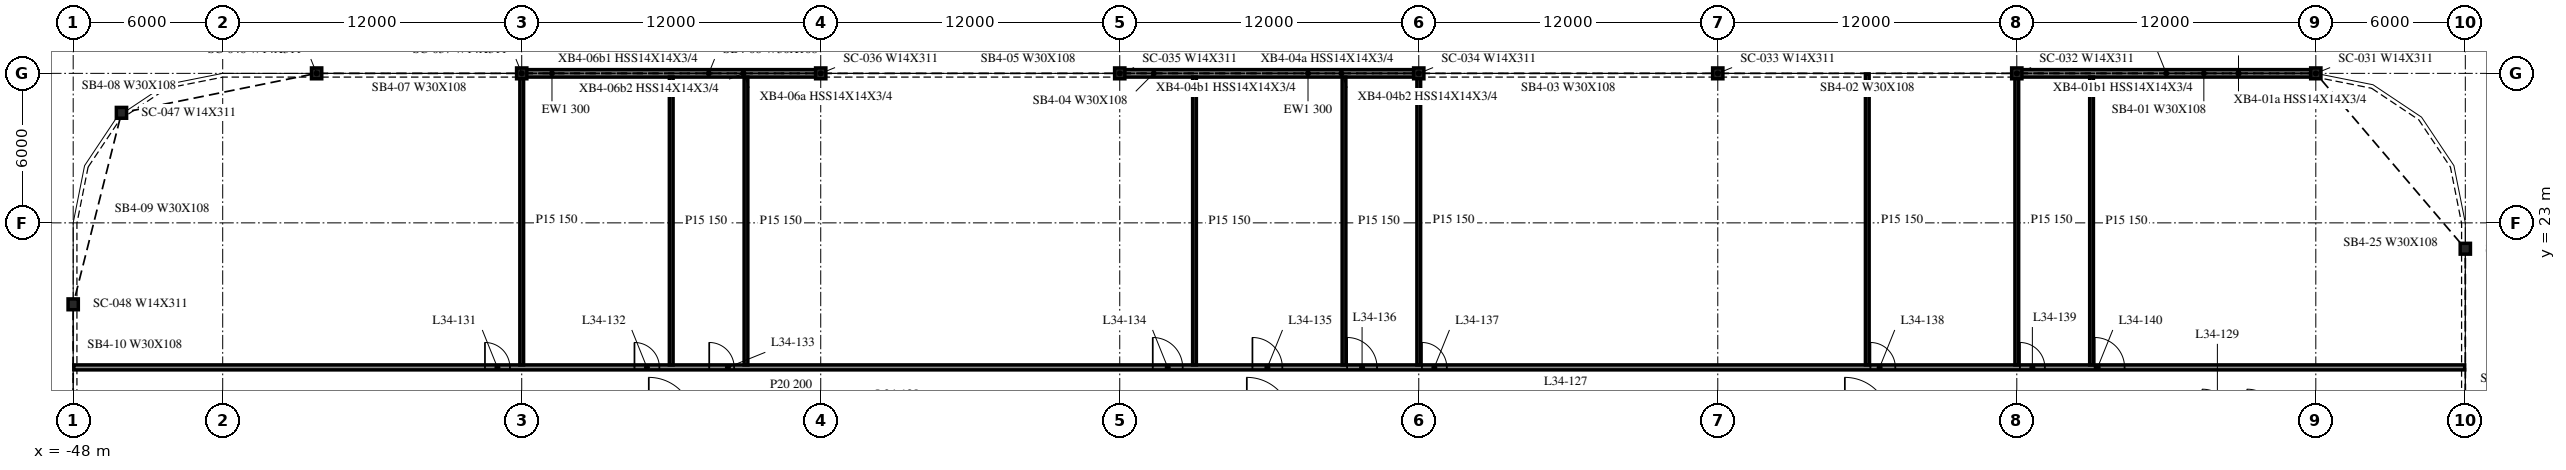
"""IFC4 building model, lengths in metres.
Left out: names, types, materials, properties, quantities, classifications, styles, units other than length and angle.
Written with IfcOpenShell. Run it as: python <this file> out.ifc"""

import sys

from ifc_helpers import new_model, si_unit, direction, frame, frame_2d, origin, origin_2d, place, context, subcontext, project, spatial, rectangle, i_section, extrude, element, fill, save


model = new_model("IFC4")
c1 = context("Model", 3, precision=1e-05, world=origin(), true_north=direction((0.0, 1.0)))
c2 = subcontext(c1, "Body", "Model", "MODEL_VIEW")
j1 = project(units=[si_unit("LENGTHUNIT", "METRE"), si_unit("PLANEANGLEUNIT", "RADIAN")], contexts=[c1])
p1 = place(None, origin())
s1 = spatial("IfcSite", under=j1, at=p1, CompositionType="ELEMENT")
p2 = place(p1, origin())
s2 = spatial("IfcBuilding", under=s1, at=p2, CompositionType="ELEMENT")
p3 = place(p2, frame((0.0, 0.0, 146.6)))
s3 = spatial("IfcBuildingStorey", under=s2, at=p3, CompositionType="ELEMENT", Elevation=146.6)
for number, where, z_axis, x_axis in (
    (1, (42.0, 29.0, -0.34), (0.0, 0.0, 1.0), (1.0, 0.0, 0.0)),
    (2, (30.0, 29.0, -0.34), (0.0, 0.0, 1.0), (1.0, 0.0, 0.0)),
    (3, (18.0, 29.0, -0.34), (0.0, 0.0, 1.0), (1.0, 0.0, 0.0)),
    (4, (6.0, 29.0, -0.34), (0.0, 0.0, 1.0), (1.0, 0.0, 0.0)),
    (5, (-6.0, 29.0, -0.34), (0.0, 0.0, 1.0), (1.0, 0.0, 0.0)),
    (6, (-18.0, 29.0, -0.34), (0.0, 0.0, 1.0), (1.0, 0.0, 0.0)),
    (7, (-30.0, 29.0, -0.34), (0.0, 0.0, 1.0), (1.0, 0.0, 0.0)),
    (8, (-38.231, 29.0, -0.34), (0.0, 0.0, 1.0), (1.0, 0.0, 0.0)),
    (9, (-46.062, 27.416, -0.34), (0.0, 0.0, 1.0), (1.0, 0.0, 0.0)),
    (10, (-48.0, 19.731, -0.34), (0.0, 0.0, 1.0), (1.0, 0.0, 0.0)),
    (11, (48.0, 21.962, -0.34), (0.0, 0.0, 1.0), (1.0, 0.0, 0.0)),
):
    element("IfcColumn", number, at=place(p3, frame(where, z_axis=z_axis, x_axis=x_axis)), inside=s3, PredefinedType="COLUMN", context=c2, shape_type="SweptSolid", body=[
        extrude(i_section(OverallWidth=0.412, OverallDepth=0.434, WebThickness=0.036, FlangeThickness=0.057, at=origin_2d()), origin(), (0.0, 0.0, 1.0), 4.1),
    ])
for number, where, z_axis, x_axis in (
    (12, (41.982, 29.0, 0.0), (0.0, 0.0, 1.0), (-1.0, 0.0, 0.0)),
    (13, (5.982, 29.0, 0.0), (0.0, 0.0, 1.0), (-1.0, 0.0, 0.0)),
    (14, (-18.018, 29.0, 0.0), (0.0, 0.0, 1.0), (-1.0, 0.0, 0.0)),
):
    element("IfcWall", number, at=place(p3, frame(where, z_axis=z_axis, x_axis=x_axis)), inside=s3, PredefinedType="NOTDEFINED", context=c2, shape_type="SweptSolid", body=[
        extrude(rectangle(XDim=11.964, YDim=0.3, at=frame_2d((5.982, 0.0))), origin(), (0.0, 0.0, 1.0), 3.003),
    ])
p4 = place(p3, frame((-47.975, 17.2, 0.0), z_axis=(0.0, 0.0, 1.0), x_axis=(1.0, 0.0, 0.0)))
e15 = element("IfcWall", 15, at=p4, inside=s3, PredefinedType="PARTITIONING", context=c2, shape_type="SweptSolid", body=[
    extrude(rectangle(XDim=95.95, YDim=0.2, at=frame_2d((47.975, 0.0))), origin(), (0.0, 0.0, 1.0), 3.76),
])
p5 = place(p4, frame((16.5, 0.0, 0.0)))
e16 = element("IfcOpeningElement", 16, at=p5, cuts=e15, PredefinedType="OPENING", context=c2, shape_type="SweptSolid", body=[
    extrude(rectangle(XDim=1.0, YDim=2.1, at=frame_2d((0.5, 1.05))), frame((0.0, 0.11, 0.0), z_axis=(0.0, -1.0, 0.0), x_axis=(1.0, 0.0, 0.0)), (0.0, 0.0, 1.0), 0.22),
])
p6 = place(p4, frame((22.5, 0.0, 0.0)))
e17 = element("IfcOpeningElement", 17, at=p6, cuts=e15, PredefinedType="OPENING", context=c2, shape_type="SweptSolid", body=[
    extrude(rectangle(XDim=1.0, YDim=2.1, at=frame_2d((0.5, 1.05))), frame((0.0, 0.11, 0.0), z_axis=(0.0, -1.0, 0.0), x_axis=(1.0, 0.0, 0.0)), (0.0, 0.0, 1.0), 0.22),
])
p7 = place(p4, frame((25.5, 0.0, 0.0)))
e18 = element("IfcOpeningElement", 18, at=p7, cuts=e15, PredefinedType="OPENING", context=c2, shape_type="SweptSolid", body=[
    extrude(rectangle(XDim=1.0, YDim=2.1, at=frame_2d((0.5, 1.05))), frame((0.0, 0.11, 0.0), z_axis=(0.0, -1.0, 0.0), x_axis=(1.0, 0.0, 0.0)), (0.0, 0.0, 1.0), 0.22),
])
p8 = place(p4, frame((43.3, 0.0, 0.0)))
e19 = element("IfcOpeningElement", 19, at=p8, cuts=e15, PredefinedType="OPENING", context=c2, shape_type="SweptSolid", body=[
    extrude(rectangle(XDim=1.2, YDim=2.1, at=frame_2d((0.6, 1.05))), frame((0.0, 0.11, 0.0), z_axis=(0.0, -1.0, 0.0), x_axis=(1.0, 0.0, 0.0)), (0.0, 0.0, 1.0), 0.22),
])
p9 = place(p4, frame((47.3, 0.0, 0.0)))
e20 = element("IfcOpeningElement", 20, at=p9, cuts=e15, PredefinedType="OPENING", context=c2, shape_type="SweptSolid", body=[
    extrude(rectangle(XDim=1.2, YDim=2.1, at=frame_2d((0.6, 1.05))), frame((0.0, 0.11, 0.0), z_axis=(0.0, -1.0, 0.0), x_axis=(1.0, 0.0, 0.0)), (0.0, 0.0, 1.0), 0.22),
])
p10 = place(p4, frame((51.1, 0.0, 0.0)))
e21 = element("IfcOpeningElement", 21, at=p10, cuts=e15, PredefinedType="OPENING", context=c2, shape_type="SweptSolid", body=[
    extrude(rectangle(XDim=1.2, YDim=2.1, at=frame_2d((0.6, 1.05))), frame((0.0, 0.11, 0.0), z_axis=(0.0, -1.0, 0.0), x_axis=(1.0, 0.0, 0.0)), (0.0, 0.0, 1.0), 0.22),
])
p11 = place(p4, frame((54.1, 0.0, 0.0)))
e22 = element("IfcOpeningElement", 22, at=p11, cuts=e15, PredefinedType="OPENING", context=c2, shape_type="SweptSolid", body=[
    extrude(rectangle(XDim=1.0, YDim=2.1, at=frame_2d((0.5, 1.05))), frame((0.0, 0.11, 0.0), z_axis=(0.0, -1.0, 0.0), x_axis=(1.0, 0.0, 0.0)), (0.0, 0.0, 1.0), 0.22),
])
p12 = place(p4, frame((72.1, 0.0, 0.0)))
e23 = element("IfcOpeningElement", 23, at=p12, cuts=e15, PredefinedType="OPENING", context=c2, shape_type="SweptSolid", body=[
    extrude(rectangle(XDim=1.0, YDim=2.1, at=frame_2d((0.5, 1.05))), frame((0.0, 0.11, 0.0), z_axis=(0.0, -1.0, 0.0), x_axis=(1.0, 0.0, 0.0)), (0.0, 0.0, 1.0), 0.22),
])
p13 = place(p4, frame((78.1, 0.0, 0.0)))
e24 = element("IfcOpeningElement", 24, at=p13, cuts=e15, PredefinedType="OPENING", context=c2, shape_type="SweptSolid", body=[
    extrude(rectangle(XDim=1.0, YDim=2.1, at=frame_2d((0.5, 1.05))), frame((0.0, 0.11, 0.0), z_axis=(0.0, -1.0, 0.0), x_axis=(1.0, 0.0, 0.0)), (0.0, 0.0, 1.0), 0.22),
])
p14 = place(p4, frame((81.1, 0.0, 0.0)))
e25 = element("IfcOpeningElement", 25, at=p14, cuts=e15, PredefinedType="OPENING", context=c2, shape_type="SweptSolid", body=[
    extrude(rectangle(XDim=1.2, YDim=2.1, at=frame_2d((0.6, 1.05))), frame((0.0, 0.11, 0.0), z_axis=(0.0, -1.0, 0.0), x_axis=(1.0, 0.0, 0.0)), (0.0, 0.0, 1.0), 0.22),
])
p15 = place(p3, frame((-30.0, 17.3, 0.0), z_axis=(0.0, 0.0, 1.0), x_axis=(0.0, 1.0, 0.0)))
e26 = element("IfcWall", 26, at=p15, inside=s3, PredefinedType="PARTITIONING", context=c2, shape_type="SweptSolid", body=[
    extrude(rectangle(XDim=11.675, YDim=0.15, at=frame_2d((5.837, 0.0))), origin(), (0.0, 0.0, 1.0), 3.76),
])
for number, where, z_axis, x_axis in (
    (27, (-24.0, 17.3, 0.0), (0.0, 0.0, 1.0), (0.0, 1.0, 0.0)),
    (28, (-21.0, 17.3, 0.0), (0.0, 0.0, 1.0), (0.0, 1.0, 0.0)),
    (29, (-3.0, 17.3, 0.0), (0.0, 0.0, 1.0), (0.0, 1.0, 0.0)),
    (30, (3.0, 17.3, 0.0), (0.0, 0.0, 1.0), (0.0, 1.0, 0.0)),
):
    element("IfcWall", number, at=place(p3, frame(where, z_axis=z_axis, x_axis=x_axis)), inside=s3, PredefinedType="PARTITIONING", context=c2, shape_type="SweptSolid", body=[
        extrude(rectangle(XDim=11.55, YDim=0.15, at=frame_2d((5.775, 0.0))), origin(), (0.0, 0.0, 1.0), 3.76),
    ])
for number, where, z_axis, x_axis in (
    (31, (6.0, 17.3, 0.0), (0.0, 0.0, 1.0), (0.0, 1.0, 0.0)),
    (32, (24.0, 17.3, 0.0), (0.0, 0.0, 1.0), (0.0, 1.0, 0.0)),
    (33, (30.0, 17.3, 0.0), (0.0, 0.0, 1.0), (0.0, 1.0, 0.0)),
):
    element("IfcWall", number, at=place(p3, frame(where, z_axis=z_axis, x_axis=x_axis)), inside=s3, PredefinedType="PARTITIONING", context=c2, shape_type="SweptSolid", body=[
        extrude(rectangle(XDim=11.675, YDim=0.15, at=frame_2d((5.837, 0.0))), origin(), (0.0, 0.0, 1.0), 3.76),
    ])
p16 = place(p3, frame((33.0, 17.3, 0.0), z_axis=(0.0, 0.0, 1.0), x_axis=(0.0, 1.0, 0.0)))
e34 = element("IfcWall", 34, at=p16, inside=s3, PredefinedType="PARTITIONING", context=c2, shape_type="SweptSolid", body=[
    extrude(rectangle(XDim=11.55, YDim=0.15, at=frame_2d((5.775, 0.0))), origin(), (0.0, 0.0, 1.0), 3.76),
])
p17 = place(p5, origin())
e35 = element("IfcDoor", 35, at=p17, inside=s3, OperationType="SINGLE_SWING_LEFT", PredefinedType="DOOR", context=c2, shape_type="SweptSolid", body=[
    extrude(rectangle(XDim=1.0, YDim=2.1, at=frame_2d((0.5, 1.05))), frame((0.0, 0.025, 0.0), z_axis=(0.0, -1.0, 0.0), x_axis=(1.0, 0.0, 0.0)), (0.0, 0.0, 1.0), 0.05),
])
fill(e16, e35)
p18 = place(p6, origin())
e36 = element("IfcDoor", 36, at=p18, inside=s3, OperationType="SINGLE_SWING_LEFT", PredefinedType="DOOR", context=c2, shape_type="SweptSolid", body=[
    extrude(rectangle(XDim=1.0, YDim=2.1, at=frame_2d((0.5, 1.05))), frame((0.0, 0.025, 0.0), z_axis=(0.0, -1.0, 0.0), x_axis=(1.0, 0.0, 0.0)), (0.0, 0.0, 1.0), 0.05),
])
fill(e17, e36)
p19 = place(p7, origin())
e37 = element("IfcDoor", 37, at=p19, inside=s3, OperationType="SINGLE_SWING_LEFT", PredefinedType="DOOR", context=c2, shape_type="SweptSolid", body=[
    extrude(rectangle(XDim=1.0, YDim=2.1, at=frame_2d((0.5, 1.05))), frame((0.0, 0.025, 0.0), z_axis=(0.0, -1.0, 0.0), x_axis=(1.0, 0.0, 0.0)), (0.0, 0.0, 1.0), 0.05),
])
fill(e18, e37)
p20 = place(p8, origin())
e38 = element("IfcDoor", 38, at=p20, inside=s3, OperationType="SINGLE_SWING_LEFT", PredefinedType="DOOR", context=c2, shape_type="SweptSolid", body=[
    extrude(rectangle(XDim=1.2, YDim=2.1, at=frame_2d((0.6, 1.05))), frame((0.0, 0.025, 0.0), z_axis=(0.0, -1.0, 0.0), x_axis=(1.0, 0.0, 0.0)), (0.0, 0.0, 1.0), 0.05),
])
fill(e19, e38)
p21 = place(p9, origin())
e39 = element("IfcDoor", 39, at=p21, inside=s3, OperationType="SINGLE_SWING_RIGHT", PredefinedType="DOOR", context=c2, shape_type="SweptSolid", body=[
    extrude(rectangle(XDim=1.2, YDim=2.1, at=frame_2d((0.6, 1.05))), frame((0.0, 0.025, 0.0), z_axis=(0.0, -1.0, 0.0), x_axis=(1.0, 0.0, 0.0)), (0.0, 0.0, 1.0), 0.05),
])
fill(e20, e39)
p22 = place(p10, origin())
e40 = element("IfcDoor", 40, at=p22, inside=s3, OperationType="SINGLE_SWING_RIGHT", PredefinedType="DOOR", context=c2, shape_type="SweptSolid", body=[
    extrude(rectangle(XDim=1.2, YDim=2.1, at=frame_2d((0.6, 1.05))), frame((0.0, 0.025, 0.0), z_axis=(0.0, -1.0, 0.0), x_axis=(1.0, 0.0, 0.0)), (0.0, 0.0, 1.0), 0.05),
])
fill(e21, e40)
p23 = place(p11, origin())
e41 = element("IfcDoor", 41, at=p23, inside=s3, OperationType="SINGLE_SWING_RIGHT", PredefinedType="DOOR", context=c2, shape_type="SweptSolid", body=[
    extrude(rectangle(XDim=1.0, YDim=2.1, at=frame_2d((0.5, 1.05))), frame((0.0, 0.025, 0.0), z_axis=(0.0, -1.0, 0.0), x_axis=(1.0, 0.0, 0.0)), (0.0, 0.0, 1.0), 0.05),
])
fill(e22, e41)
p24 = place(p12, origin())
e42 = element("IfcDoor", 42, at=p24, inside=s3, OperationType="SINGLE_SWING_RIGHT", PredefinedType="DOOR", context=c2, shape_type="SweptSolid", body=[
    extrude(rectangle(XDim=1.0, YDim=2.1, at=frame_2d((0.5, 1.05))), frame((0.0, 0.025, 0.0), z_axis=(0.0, -1.0, 0.0), x_axis=(1.0, 0.0, 0.0)), (0.0, 0.0, 1.0), 0.05),
])
fill(e23, e42)
p25 = place(p13, origin())
e43 = element("IfcDoor", 43, at=p25, inside=s3, OperationType="SINGLE_SWING_RIGHT", PredefinedType="DOOR", context=c2, shape_type="SweptSolid", body=[
    extrude(rectangle(XDim=1.0, YDim=2.1, at=frame_2d((0.5, 1.05))), frame((0.0, 0.025, 0.0), z_axis=(0.0, -1.0, 0.0), x_axis=(1.0, 0.0, 0.0)), (0.0, 0.0, 1.0), 0.05),
])
fill(e24, e43)
p26 = place(p14, origin())
e44 = element("IfcDoor", 44, at=p26, inside=s3, OperationType="SINGLE_SWING_RIGHT", PredefinedType="DOOR", context=c2, shape_type="SweptSolid", body=[
    extrude(rectangle(XDim=1.2, YDim=2.1, at=frame_2d((0.6, 1.05))), frame((0.0, 0.025, 0.0), z_axis=(0.0, -1.0, 0.0), x_axis=(1.0, 0.0, 0.0)), (0.0, 0.0, 1.0), 0.05),
])
fill(e25, e44)
save(model, sys.argv[1])
